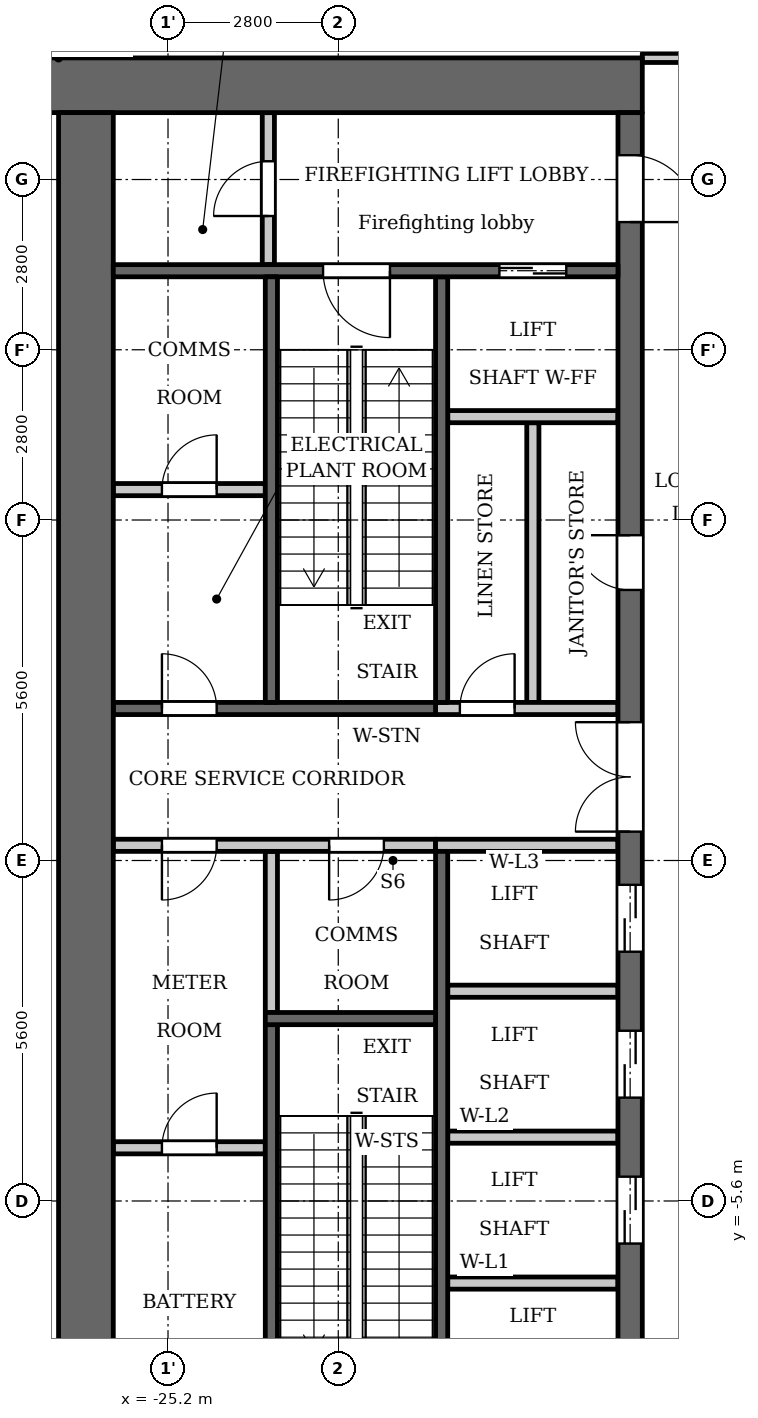
"""IFC4 building model, lengths in metres.
Left out: names, types, materials, properties, quantities, classifications, styles, units other than length and angle.
Written with IfcOpenShell. Run it as: python <this file> out.ifc"""

import sys

from ifc_helpers import new_model, si_unit, direction, frame, frame_2d, origin, place, context, subcontext, project, spatial, rectangle, extrude, element, fill, save


model = new_model("IFC4")
c1 = context("Model", 3, precision=1e-05, world=origin(), true_north=direction((0.0, 1.0)))
c2 = subcontext(c1, "Body", "Model", "MODEL_VIEW")
j1 = project(units=[si_unit("LENGTHUNIT", "METRE"), si_unit("PLANEANGLEUNIT", "RADIAN")], contexts=[c1])
p1 = place(None, origin())
s1 = spatial("IfcSite", under=j1, at=p1, CompositionType="ELEMENT")
p2 = place(p1, origin())
s2 = spatial("IfcBuilding", under=s1, at=p2, CompositionType="ELEMENT")
p3 = place(p2, frame((0.0, 0.0, 77.9)))
s3 = spatial("IfcBuildingStorey", under=s2, at=p3, CompositionType="ELEMENT", Elevation=77.9)
p4 = place(p3, frame((-23.5, -2.5, 0.0), z_axis=(0.0, 0.0, 1.0), x_axis=(0.0, 1.0, 0.0)))
e1 = element("IfcWall", 1, at=p4, inside=s3, PredefinedType="PARTITIONING", context=c2, shape_type="SweptSolid", body=[
    extrude(rectangle(XDim=2.65, YDim=0.2, at=frame_2d((1.325, 0.0))), origin(), (0.0, 0.0, 1.0), 5.1),
])
p5 = place(p3, frame((-20.7, 2.6, 0.0), z_axis=(0.0, 0.0, 1.0), x_axis=(0.0, 1.0, 0.0)))
e2 = element("IfcWall", 2, at=p5, inside=s3, PredefinedType="SHEAR", context=c2, shape_type="SweptSolid", body=[
    extrude(rectangle(XDim=7.0, YDim=0.2, at=frame_2d((3.5, 0.0))), origin(), (0.0, 0.0, 1.0), 5.1),
])
p6 = place(p3, frame((-20.7, -9.6, 0.0), z_axis=(0.0, 0.0, 1.0), x_axis=(0.0, 1.0, 0.0)))
e3 = element("IfcWall", 3, at=p6, inside=s3, PredefinedType="SHEAR", context=c2, shape_type="SweptSolid", body=[
    extrude(rectangle(XDim=9.75, YDim=0.2, at=frame_2d((4.875, 0.0))), origin(), (0.0, 0.0, 1.0), 5.1),
])
p7 = place(p3, frame((-20.8, 2.5, 0.0), z_axis=(0.0, 0.0, 1.0), x_axis=(-1.0, 0.0, 0.0)))
e4 = element("IfcWall", 4, at=p7, inside=s3, PredefinedType="SHEAR", context=c2, shape_type="SweptSolid", body=[
    extrude(rectangle(XDim=5.3, YDim=0.2, at=frame_2d((2.65, 0.0))), origin(), (0.0, 0.0, 1.0), 5.1),
])
p8 = place(p7, frame((3.6, 0.0, 0.0)))
e5 = element("IfcOpeningElement", 5, at=p8, cuts=e4, PredefinedType="OPENING", context=c2, shape_type="SweptSolid", body=[
    extrude(rectangle(XDim=0.9, YDim=2.1, at=frame_2d((0.45, 1.05))), frame((0.0, 0.11, 0.0), z_axis=(0.0, -1.0, 0.0), x_axis=(1.0, 0.0, 0.0)), (0.0, 0.0, 1.0), 0.22),
])
p9 = place(p3, frame((-20.8, 0.25, 0.0), z_axis=(0.0, 0.0, 1.0), x_axis=(-1.0, 0.0, 0.0)))
e6 = element("IfcWall", 6, at=p9, inside=s3, PredefinedType="PARTITIONING", context=c2, shape_type="SweptSolid", body=[
    extrude(rectangle(XDim=5.3, YDim=0.2, at=frame_2d((2.65, 0.0))), origin(), (0.0, 0.0, 1.0), 5.1),
])
p10 = place(p9, frame((0.85, 0.0, 0.0)))
e7 = element("IfcOpeningElement", 7, at=p10, cuts=e6, PredefinedType="OPENING", context=c2, shape_type="SweptSolid", body=[
    extrude(rectangle(XDim=0.9, YDim=2.1, at=frame_2d((0.45, 1.05))), frame((0.0, 0.11, 0.0), z_axis=(0.0, -1.0, 0.0), x_axis=(1.0, 0.0, 0.0)), (0.0, 0.0, 1.0), 0.22),
])
p11 = place(p9, frame((3.6, 0.0, 0.0)))
e8 = element("IfcOpeningElement", 8, at=p11, cuts=e6, PredefinedType="OPENING", context=c2, shape_type="SweptSolid", body=[
    extrude(rectangle(XDim=0.9, YDim=2.1, at=frame_2d((0.45, 1.05))), frame((0.0, 0.11, 0.0), z_axis=(0.0, -1.0, 0.0), x_axis=(1.0, 0.0, 0.0)), (0.0, 0.0, 1.0), 0.22),
])
p12 = place(p3, frame((-17.4, 12.75, 0.0), z_axis=(0.0, 0.0, 1.0), x_axis=(-1.0, 0.0, 0.0)))
e9 = element("IfcWall", 9, at=p12, inside=s3, PredefinedType="SHEAR", context=c2, shape_type="SweptSolid", body=[
    extrude(rectangle(XDim=10.4, YDim=0.9, at=frame_2d((5.2, 0.0))), origin(), (0.0, 0.0, 1.0), 5.1),
])
p13 = place(p3, frame((-19.2, 2.6, 0.0), z_axis=(0.0, 0.0, 1.0), x_axis=(0.0, 1.0, 0.0)))
e10 = element("IfcWall", 10, at=p13, inside=s3, PredefinedType="PARTITIONING", context=c2, shape_type="SweptSolid", body=[
    extrude(rectangle(XDim=4.6, YDim=0.2, at=frame_2d((2.3, 0.0))), origin(), (0.0, 0.0, 1.0), 5.1),
])
p14 = place(p3, frame((-17.6, -12.3, 0.0), z_axis=(0.0, 0.0, 1.0), x_axis=(0.0, 1.0, 0.0)))
e11 = element("IfcWall", 11, at=p14, inside=s3, PredefinedType="SHEAR", context=c2, shape_type="SweptSolid", body=[
    extrude(rectangle(XDim=24.6, YDim=0.4, at=frame_2d((12.3, 0.0))), origin(), (0.0, 0.0, 1.0), 5.1),
])
p15 = place(p14, frame((6.0, 0.0, 0.0)))
e12 = element("IfcOpeningElement", 12, at=p15, cuts=e11, PredefinedType="OPENING", context=c2, shape_type="SweptSolid", body=[
    extrude(rectangle(XDim=1.1, YDim=2.1, at=frame_2d((0.55, 1.05))), frame((0.0, 0.21, 0.0), z_axis=(0.0, -1.0, 0.0), x_axis=(1.0, 0.0, 0.0)), (0.0, 0.0, 1.0), 0.42),
])
p16 = place(p14, frame((8.4, 0.0, 0.0)))
e13 = element("IfcOpeningElement", 13, at=p16, cuts=e11, PredefinedType="OPENING", context=c2, shape_type="SweptSolid", body=[
    extrude(rectangle(XDim=1.1, YDim=2.1, at=frame_2d((0.55, 1.05))), frame((0.0, 0.21, 0.0), z_axis=(0.0, -1.0, 0.0), x_axis=(1.0, 0.0, 0.0)), (0.0, 0.0, 1.0), 0.42),
])
p17 = place(p14, frame((10.8, 0.0, 0.0)))
e14 = element("IfcOpeningElement", 14, at=p17, cuts=e11, PredefinedType="OPENING", context=c2, shape_type="SweptSolid", body=[
    extrude(rectangle(XDim=1.1, YDim=2.1, at=frame_2d((0.55, 1.05))), frame((0.0, 0.21, 0.0), z_axis=(0.0, -1.0, 0.0), x_axis=(1.0, 0.0, 0.0)), (0.0, 0.0, 1.0), 0.42),
])
p18 = place(p14, frame((16.75, 0.0, 0.0)))
e15 = element("IfcOpeningElement", 15, at=p18, cuts=e11, PredefinedType="OPENING", context=c2, shape_type="SweptSolid", body=[
    extrude(rectangle(XDim=0.9, YDim=2.1, at=frame_2d((0.45, 1.05))), frame((0.0, 0.21, 0.0), z_axis=(0.0, -1.0, 0.0), x_axis=(1.0, 0.0, 0.0)), (0.0, 0.0, 1.0), 0.42),
])
p19 = place(p14, frame((22.8, 0.0, 0.0)))
e16 = element("IfcOpeningElement", 16, at=p19, cuts=e11, PredefinedType="OPENING", context=c2, shape_type="SweptSolid", body=[
    extrude(rectangle(XDim=1.1, YDim=2.1, at=frame_2d((0.55, 1.05))), frame((0.0, 0.21, 0.0), z_axis=(0.0, -1.0, 0.0), x_axis=(1.0, 0.0, 0.0)), (0.0, 0.0, 1.0), 0.42),
])
p20 = place(p14, frame((0.7, 0.0, 0.0)))
e17 = element("IfcOpeningElement", 17, at=p20, cuts=e11, PredefinedType="OPENING", context=c2, shape_type="SweptSolid", body=[
    extrude(rectangle(XDim=1.1, YDim=2.1, at=frame_2d((0.55, 1.05))), frame((0.0, 0.21, 0.0), z_axis=(0.0, -1.0, 0.0), x_axis=(1.0, 0.0, 0.0)), (0.0, 0.0, 1.0), 0.42),
])
p21 = place(p14, frame((12.775, 0.0, 0.0)))
e18 = element("IfcOpeningElement", 18, at=p21, cuts=e11, PredefinedType="OPENING", context=c2, shape_type="SweptSolid", body=[
    extrude(rectangle(XDim=1.8, YDim=2.1, at=frame_2d((0.9, 1.05))), frame((0.0, 0.21, 0.0), z_axis=(0.0, -1.0, 0.0), x_axis=(1.0, 0.0, 0.0)), (0.0, 0.0, 1.0), 0.42),
])
p22 = place(p3, frame((-26.55, -12.3, 0.0), z_axis=(0.0, 0.0, 1.0), x_axis=(0.0, 1.0, 0.0)))
e19 = element("IfcWall", 19, at=p22, inside=s3, PredefinedType="SHEAR", context=c2, shape_type="SweptSolid", body=[
    extrude(rectangle(XDim=24.6, YDim=0.9, at=frame_2d((12.3, 0.0))), origin(), (0.0, 0.0, 1.0), 5.1),
])
p23 = place(p3, frame((-23.55, 9.8, 0.0), z_axis=(0.0, 0.0, 1.0), x_axis=(0.0, 1.0, 0.0)))
e20 = element("IfcWall", 20, at=p23, inside=s3, PredefinedType="PARTITIONING", context=c2, shape_type="SweptSolid", body=[
    extrude(rectangle(XDim=2.5, YDim=0.2, at=frame_2d((1.25, 0.0))), origin(), (0.0, 0.0, 1.0), 5.1),
])
p24 = place(p23, frame((0.8, 0.0, 0.0)))
e21 = element("IfcOpeningElement", 21, at=p24, cuts=e20, PredefinedType="OPENING", context=c2, shape_type="SweptSolid", body=[
    extrude(rectangle(XDim=0.9, YDim=2.1, at=frame_2d((0.45, 1.05))), frame((0.0, 0.11, 0.0), z_axis=(0.0, -1.0, 0.0), x_axis=(1.0, 0.0, 0.0)), (0.0, 0.0, 1.0), 0.22),
])
p25 = place(p3, frame((-23.6, -4.725, 0.0), z_axis=(0.0, 0.0, 1.0), x_axis=(-1.0, 0.0, 0.0)))
e22 = element("IfcWall", 22, at=p25, inside=s3, PredefinedType="PARTITIONING", context=c2, shape_type="SweptSolid", body=[
    extrude(rectangle(XDim=2.5, YDim=0.2, at=frame_2d((1.25, 0.0))), origin(), (0.0, 0.0, 1.0), 5.1),
])
p26 = place(p25, frame((0.8, 0.0, 0.0)))
e23 = element("IfcOpeningElement", 23, at=p26, cuts=e22, PredefinedType="OPENING", context=c2, shape_type="SweptSolid", body=[
    extrude(rectangle(XDim=0.9, YDim=2.1, at=frame_2d((0.45, 1.05))), frame((0.0, 0.11, 0.0), z_axis=(0.0, -1.0, 0.0), x_axis=(1.0, 0.0, 0.0)), (0.0, 0.0, 1.0), 0.22),
])
p27 = place(p3, frame((-23.6, 6.1, 0.0), z_axis=(0.0, 0.0, 1.0), x_axis=(-1.0, 0.0, 0.0)))
e24 = element("IfcWall", 24, at=p27, inside=s3, PredefinedType="PARTITIONING", context=c2, shape_type="SweptSolid", body=[
    extrude(rectangle(XDim=2.5, YDim=0.2, at=frame_2d((1.25, 0.0))), origin(), (0.0, 0.0, 1.0), 5.1),
])
p28 = place(p27, frame((0.8, 0.0, 0.0)))
e25 = element("IfcOpeningElement", 25, at=p28, cuts=e24, PredefinedType="OPENING", context=c2, shape_type="SweptSolid", body=[
    extrude(rectangle(XDim=0.9, YDim=2.1, at=frame_2d((0.45, 1.05))), frame((0.0, 0.11, 0.0), z_axis=(0.0, -1.0, 0.0), x_axis=(1.0, 0.0, 0.0)), (0.0, 0.0, 1.0), 0.22),
])
for number, where, z_axis, x_axis in (
    (26, (-17.8, -6.95, 0.0), (0.0, 0.0, 1.0), (-1.0, 0.0, 0.0)),
    (27, (-17.8, -4.55, 0.0), (0.0, 0.0, 1.0), (-1.0, 0.0, 0.0)),
    (28, (-17.8, -2.15, 0.0), (0.0, 0.0, 1.0), (-1.0, 0.0, 0.0)),
):
    element("IfcWall", number, at=place(p3, frame(where, z_axis=z_axis, x_axis=x_axis)), inside=s3, PredefinedType="PARTITIONING", context=c2, shape_type="SweptSolid", body=[
        extrude(rectangle(XDim=2.8, YDim=0.2, at=frame_2d((1.4, 0.0))), origin(), (0.0, 0.0, 1.0), 5.1),
    ])
p29 = place(p3, frame((-17.8, 0.25, 0.0), z_axis=(0.0, 0.0, 1.0), x_axis=(-1.0, 0.0, 0.0)))
e29 = element("IfcWall", 29, at=p29, inside=s3, PredefinedType="PARTITIONING", context=c2, shape_type="SweptSolid", body=[
    extrude(rectangle(XDim=3.0, YDim=0.2, at=frame_2d((1.5, 0.0))), origin(), (0.0, 0.0, 1.0), 5.1),
])
p30 = place(p3, frame((-17.8, 2.5, 0.0), z_axis=(0.0, 0.0, 1.0), x_axis=(-1.0, 0.0, 0.0)))
e30 = element("IfcWall", 30, at=p30, inside=s3, PredefinedType="PARTITIONING", context=c2, shape_type="SweptSolid", body=[
    extrude(rectangle(XDim=3.0, YDim=0.2, at=frame_2d((1.5, 0.0))), origin(), (0.0, 0.0, 1.0), 5.1),
])
p31 = place(p30, frame((1.7, 0.0, 0.0)))
e31 = element("IfcOpeningElement", 31, at=p31, cuts=e30, PredefinedType="OPENING", context=c2, shape_type="SweptSolid", body=[
    extrude(rectangle(XDim=0.9, YDim=2.1, at=frame_2d((0.45, 1.05))), frame((0.0, 0.11, 0.0), z_axis=(0.0, -1.0, 0.0), x_axis=(1.0, 0.0, 0.0)), (0.0, 0.0, 1.0), 0.22),
])
p32 = place(p3, frame((-17.8, 7.3, 0.0), z_axis=(0.0, 0.0, 1.0), x_axis=(-1.0, 0.0, 0.0)))
e32 = element("IfcWall", 32, at=p32, inside=s3, PredefinedType="PARTITIONING", context=c2, shape_type="SweptSolid", body=[
    extrude(rectangle(XDim=2.8, YDim=0.2, at=frame_2d((1.4, 0.0))), origin(), (0.0, 0.0, 1.0), 5.1),
])
p33 = place(p3, frame((-17.8, 9.7, 0.0), z_axis=(0.0, 0.0, 1.0), x_axis=(-1.0, 0.0, 0.0)))
e33 = element("IfcWall", 33, at=p33, inside=s3, PredefinedType="SHEAR", context=c2, shape_type="SweptSolid", body=[
    extrude(rectangle(XDim=8.3, YDim=0.2, at=frame_2d((4.15, 0.0))), origin(), (0.0, 0.0, 1.0), 5.1),
])
p34 = place(p33, frame((0.85, 0.0, 0.0)))
e34 = element("IfcOpeningElement", 34, at=p34, cuts=e33, PredefinedType="OPENING", context=c2, shape_type="SweptSolid", body=[
    extrude(rectangle(XDim=1.1, YDim=2.1, at=frame_2d((0.55, 1.05))), frame((0.0, 0.11, 0.0), z_axis=(0.0, -1.0, 0.0), x_axis=(1.0, 0.0, 0.0)), (0.0, 0.0, 1.0), 0.22),
])
p35 = place(p33, frame((3.75, 0.0, 0.0)))
e35 = element("IfcOpeningElement", 35, at=p35, cuts=e33, PredefinedType="OPENING", context=c2, shape_type="SweptSolid", body=[
    extrude(rectangle(XDim=1.1, YDim=2.1, at=frame_2d((0.55, 1.05))), frame((0.0, 0.11, 0.0), z_axis=(0.0, -1.0, 0.0), x_axis=(1.0, 0.0, 0.0)), (0.0, 0.0, 1.0), 0.22),
])
p36 = place(p3, frame((-23.5, 2.6, 0.0), z_axis=(0.0, 0.0, 1.0), x_axis=(0.0, 1.0, 0.0)))
e36 = element("IfcWall", 36, at=p36, inside=s3, PredefinedType="SHEAR", context=c2, shape_type="SweptSolid", body=[
    extrude(rectangle(XDim=7.0, YDim=0.2, at=frame_2d((3.5, 0.0))), origin(), (0.0, 0.0, 1.0), 5.1),
])
p37 = place(p3, frame((-23.5, -9.6, 0.0), z_axis=(0.0, 0.0, 1.0), x_axis=(0.0, 1.0, 0.0)))
e37 = element("IfcWall", 37, at=p37, inside=s3, PredefinedType="SHEAR", context=c2, shape_type="SweptSolid", body=[
    extrude(rectangle(XDim=6.9, YDim=0.2, at=frame_2d((3.45, 0.0))), origin(), (0.0, 0.0, 1.0), 5.1),
])
p38 = place(p3, frame((-20.8, -2.6, 0.0), z_axis=(0.0, 0.0, 1.0), x_axis=(-1.0, 0.0, 0.0)))
e38 = element("IfcWall", 38, at=p38, inside=s3, PredefinedType="SHEAR", context=c2, shape_type="SweptSolid", body=[
    extrude(rectangle(XDim=2.8, YDim=0.2, at=frame_2d((1.4, 0.0))), origin(), (0.0, 0.0, 1.0), 5.1),
])
p39 = place(p3, frame((-17.4, 13.2, 0.0), z_axis=(0.0, 0.0, 1.0), x_axis=(1.0, 0.0, 0.0)))
e39 = element("IfcWall", 39, at=p39, inside=s3, PredefinedType="PARTITIONING", context=c2, shape_type="SweptSolid", body=[
    extrude(rectangle(XDim=5.88, YDim=0.15, at=frame_2d((2.94, 0.0))), origin(), (0.0, 0.0, 1.0), 5.1),
])
p40 = place(p39, frame((0.75, 0.0, 0.0)))
e40 = element("IfcOpeningElement", 40, at=p40, cuts=e39, PredefinedType="OPENING", context=c2, shape_type="SweptSolid", body=[
    extrude(rectangle(XDim=1.0, YDim=2.1, at=frame_2d((0.5, 1.05))), frame((0.0, 0.085, 0.0), z_axis=(0.0, -1.0, 0.0), x_axis=(1.0, 0.0, 0.0)), (0.0, 0.0, 1.0), 0.17),
])
p41 = place(p39, frame((4.7, 0.0, 0.0)))
e41 = element("IfcOpeningElement", 41, at=p41, cuts=e39, PredefinedType="OPENING", context=c2, shape_type="SweptSolid", body=[
    extrude(rectangle(XDim=0.9, YDim=2.1, at=frame_2d((0.45, 1.05))), frame((0.0, 0.085, 0.0), z_axis=(0.0, -1.0, 0.0), x_axis=(1.0, 0.0, 0.0)), (0.0, 0.0, 1.0), 0.17),
])
p42 = place(p39, frame((2.8, 0.0, 0.0)))
e42 = element("IfcOpeningElement", 42, at=p42, cuts=e39, PredefinedType="OPENING", context=c2, shape_type="SweptSolid", body=[
    extrude(rectangle(XDim=0.9, YDim=2.1, at=frame_2d((0.45, 1.05))), frame((0.0, 0.085, 0.0), z_axis=(0.0, -1.0, 0.0), x_axis=(1.0, 0.0, 0.0)), (0.0, 0.0, 1.0), 0.17),
])
p43 = place(p15, origin())
e43 = element("IfcDoor", 43, at=p43, inside=s3, OperationType="DOUBLE_DOOR_SLIDING", PredefinedType="DOOR", context=c2, shape_type="SweptSolid", body=[
    extrude(rectangle(XDim=1.1, YDim=2.1, at=frame_2d((0.55, 1.05))), frame((0.0, 0.025, 0.0), z_axis=(0.0, -1.0, 0.0), x_axis=(1.0, 0.0, 0.0)), (0.0, 0.0, 1.0), 0.05),
])
fill(e12, e43)
p44 = place(p16, origin())
e44 = element("IfcDoor", 44, at=p44, inside=s3, OperationType="DOUBLE_DOOR_SLIDING", PredefinedType="DOOR", context=c2, shape_type="SweptSolid", body=[
    extrude(rectangle(XDim=1.1, YDim=2.1, at=frame_2d((0.55, 1.05))), frame((0.0, 0.025, 0.0), z_axis=(0.0, -1.0, 0.0), x_axis=(1.0, 0.0, 0.0)), (0.0, 0.0, 1.0), 0.05),
])
fill(e13, e44)
p45 = place(p17, origin())
e45 = element("IfcDoor", 45, at=p45, inside=s3, OperationType="DOUBLE_DOOR_SLIDING", PredefinedType="DOOR", context=c2, shape_type="SweptSolid", body=[
    extrude(rectangle(XDim=1.1, YDim=2.1, at=frame_2d((0.55, 1.05))), frame((0.0, 0.025, 0.0), z_axis=(0.0, -1.0, 0.0), x_axis=(1.0, 0.0, 0.0)), (0.0, 0.0, 1.0), 0.05),
])
fill(e14, e45)
p46 = place(p18, origin())
e46 = element("IfcDoor", 46, at=p46, inside=s3, OperationType="SINGLE_SWING_LEFT", PredefinedType="DOOR", context=c2, shape_type="SweptSolid", body=[
    extrude(rectangle(XDim=0.9, YDim=2.1, at=frame_2d((0.45, 1.05))), frame((0.0, 0.025, 0.0), z_axis=(0.0, -1.0, 0.0), x_axis=(1.0, 0.0, 0.0)), (0.0, 0.0, 1.0), 0.05),
])
fill(e15, e46)
p47 = place(p31, origin())
e47 = element("IfcDoor", 47, at=p47, inside=s3, OperationType="SINGLE_SWING_LEFT", PredefinedType="DOOR", context=c2, shape_type="SweptSolid", body=[
    extrude(rectangle(XDim=0.9, YDim=2.1, at=frame_2d((0.45, 1.05))), frame((0.0, 0.025, 0.0), z_axis=(0.0, -1.0, 0.0), x_axis=(1.0, 0.0, 0.0)), (0.0, 0.0, 1.0), 0.05),
])
fill(e31, e47)
p48 = place(p34, origin())
e48 = element("IfcDoor", 48, at=p48, inside=s3, OperationType="DOUBLE_DOOR_SLIDING", PredefinedType="DOOR", context=c2, shape_type="SweptSolid", body=[
    extrude(rectangle(XDim=1.1, YDim=2.1, at=frame_2d((0.55, 1.05))), frame((0.0, 0.025, 0.0), z_axis=(0.0, -1.0, 0.0), x_axis=(1.0, 0.0, 0.0)), (0.0, 0.0, 1.0), 0.05),
])
fill(e34, e48)
p49 = place(p19, origin())
e49 = element("IfcDoor", 49, at=p49, inside=s3, OperationType="SINGLE_SWING_LEFT", PredefinedType="DOOR", context=c2, shape_type="SweptSolid", body=[
    extrude(rectangle(XDim=1.1, YDim=2.1, at=frame_2d((0.55, 1.05))), frame((0.0, 0.025, 0.0), z_axis=(0.0, -1.0, 0.0), x_axis=(1.0, 0.0, 0.0)), (0.0, 0.0, 1.0), 0.05),
])
fill(e16, e49)
p50 = place(p24, origin())
e50 = element("IfcDoor", 50, at=p50, inside=s3, OperationType="SINGLE_SWING_RIGHT", PredefinedType="DOOR", context=c2, shape_type="SweptSolid", body=[
    extrude(rectangle(XDim=0.9, YDim=2.1, at=frame_2d((0.45, 1.05))), frame((0.0, 0.025, 0.0), z_axis=(0.0, -1.0, 0.0), x_axis=(1.0, 0.0, 0.0)), (0.0, 0.0, 1.0), 0.05),
])
fill(e21, e50)
p51 = place(p35, origin())
e51 = element("IfcDoor", 51, at=p51, inside=s3, OperationType="SINGLE_SWING_RIGHT", PredefinedType="DOOR", context=c2, shape_type="SweptSolid", body=[
    extrude(rectangle(XDim=1.1, YDim=2.1, at=frame_2d((0.55, 1.05))), frame((0.0, 0.025, 0.0), z_axis=(0.0, -1.0, 0.0), x_axis=(1.0, 0.0, 0.0)), (0.0, 0.0, 1.0), 0.05),
])
fill(e35, e51)
p52 = place(p21, origin())
e52 = element("IfcDoor", 52, at=p52, inside=s3, OperationType="DOUBLE_DOOR_SINGLE_SWING", PredefinedType="DOOR", context=c2, shape_type="SweptSolid", body=[
    extrude(rectangle(XDim=1.8, YDim=2.1, at=frame_2d((0.9, 1.05))), frame((0.0, 0.025, 0.0), z_axis=(0.0, -1.0, 0.0), x_axis=(1.0, 0.0, 0.0)), (0.0, 0.0, 1.0), 0.05),
])
fill(e18, e52)
p53 = place(p10, origin())
e53 = element("IfcDoor", 53, at=p53, inside=s3, OperationType="SINGLE_SWING_LEFT", PredefinedType="DOOR", context=c2, shape_type="SweptSolid", body=[
    extrude(rectangle(XDim=0.9, YDim=2.1, at=frame_2d((0.45, 1.05))), frame((0.0, 0.025, 0.0), z_axis=(0.0, -1.0, 0.0), x_axis=(1.0, 0.0, 0.0)), (0.0, 0.0, 1.0), 0.05),
])
fill(e7, e53)
p54 = place(p26, origin())
e54 = element("IfcDoor", 54, at=p54, inside=s3, OperationType="SINGLE_SWING_LEFT", PredefinedType="DOOR", context=c2, shape_type="SweptSolid", body=[
    extrude(rectangle(XDim=0.9, YDim=2.1, at=frame_2d((0.45, 1.05))), frame((0.0, 0.025, 0.0), z_axis=(0.0, -1.0, 0.0), x_axis=(1.0, 0.0, 0.0)), (0.0, 0.0, 1.0), 0.05),
])
fill(e23, e54)
p55 = place(p11, origin())
e55 = element("IfcDoor", 55, at=p55, inside=s3, OperationType="SINGLE_SWING_LEFT", PredefinedType="DOOR", context=c2, shape_type="SweptSolid", body=[
    extrude(rectangle(XDim=0.9, YDim=2.1, at=frame_2d((0.45, 1.05))), frame((0.0, 0.025, 0.0), z_axis=(0.0, -1.0, 0.0), x_axis=(1.0, 0.0, 0.0)), (0.0, 0.0, 1.0), 0.05),
])
fill(e8, e55)
p56 = place(p28, origin())
e56 = element("IfcDoor", 56, at=p56, inside=s3, OperationType="SINGLE_SWING_LEFT", PredefinedType="DOOR", context=c2, shape_type="SweptSolid", body=[
    extrude(rectangle(XDim=0.9, YDim=2.1, at=frame_2d((0.45, 1.05))), frame((0.0, 0.025, 0.0), z_axis=(0.0, -1.0, 0.0), x_axis=(1.0, 0.0, 0.0)), (0.0, 0.0, 1.0), 0.05),
])
fill(e25, e56)
p57 = place(p8, origin())
e57 = element("IfcDoor", 57, at=p57, inside=s3, OperationType="SINGLE_SWING_RIGHT", PredefinedType="DOOR", context=c2, shape_type="SweptSolid", body=[
    extrude(rectangle(XDim=0.9, YDim=2.1, at=frame_2d((0.45, 1.05))), frame((0.0, 0.025, 0.0), z_axis=(0.0, -1.0, 0.0), x_axis=(1.0, 0.0, 0.0)), (0.0, 0.0, 1.0), 0.05),
])
fill(e5, e57)
save(model, sys.argv[1])
